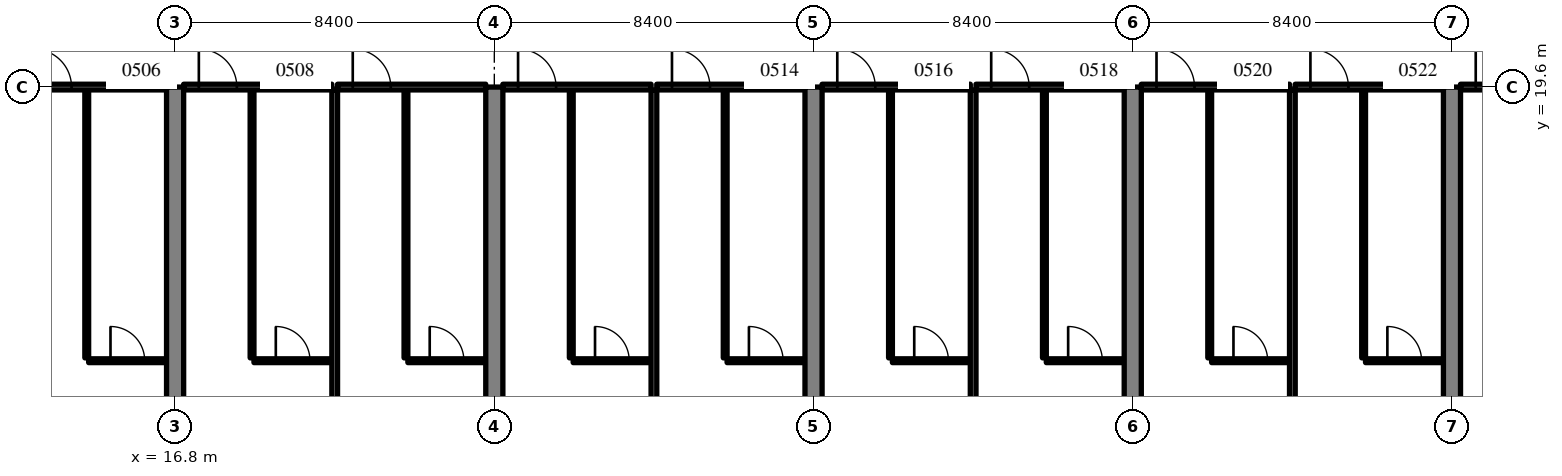
"""IFC4 building model, lengths in metres.
Left out: names, types, materials, properties, quantities, classifications, styles, units other than length and angle.
Written with IfcOpenShell. Run it as: python <this file> out.ifc"""

import sys

from ifc_helpers import new_model, si_unit, direction, frame, frame_2d, origin, place, context, subcontext, project, spatial, rectangle, extrude, source, transform, mapped, element, fill, save


model = new_model("IFC4")
c1 = context("Model", 3, precision=1e-05, world=origin(), true_north=direction((0.0, 1.0)))
c2 = subcontext(c1, "Body", "Model", "MODEL_VIEW")
j1 = project(units=[si_unit("LENGTHUNIT", "METRE"), si_unit("PLANEANGLEUNIT", "RADIAN")], contexts=[c1])
p1 = place(None, origin())
s1 = spatial("IfcSite", under=j1, at=p1, CompositionType="ELEMENT")
p2 = place(p1, origin())
s2 = spatial("IfcBuilding", under=s1, at=p2, CompositionType="ELEMENT")
p3 = place(p2, frame((0.0, 0.0, 27.8)))
s3 = spatial("IfcBuildingStorey", under=s2, at=p3, CompositionType="ELEMENT", Elevation=27.8)
m1 = source(origin(), c2, "Body", "SweptSolid", [
    extrude(rectangle(XDim=19.6, YDim=0.45, at=frame_2d((9.8, 0.0))), origin(), (0.0, 0.0, 1.0), 3.52),
])
for number, where, z_axis, x_axis in (
    (1, (16.8, 0.0, 0.0), (0.0, 0.0, 1.0), (0.0, 1.0, 0.0)),
    (2, (25.2, 0.0, 0.0), (0.0, 0.0, 1.0), (0.0, 1.0, 0.0)),
    (3, (33.6, 0.0, 0.0), (0.0, 0.0, 1.0), (0.0, 1.0, 0.0)),
    (4, (42.0, 0.0, 0.0), (0.0, 0.0, 1.0), (0.0, 1.0, 0.0)),
):
    element("IfcWall", number, at=place(p3, frame(where, z_axis=z_axis, x_axis=x_axis)), inside=s3, PredefinedType="SHEAR", context=c2, shape_type="MappedRepresentation", body=[
        mapped(m1, transform((0.0, 0.0, 0.0), scale=1.0)),
    ])
m2 = source(origin(), c2, "Body", "SweptSolid", [
    extrude(rectangle(XDim=18.6, YDim=0.45, at=frame_2d((9.3, 0.0))), origin(), (0.0, 0.0, 1.0), 3.52),
])
p4 = place(p3, frame((50.4, 1.0, 0.0), z_axis=(0.0, 0.0, 1.0), x_axis=(0.0, 1.0, 0.0)))
e5 = element("IfcWall", 5, at=p4, inside=s3, PredefinedType="SHEAR", context=c2, shape_type="MappedRepresentation", body=[
    mapped(m2, transform((0.0, 0.0, 0.0), scale=1.0)),
])
m3 = source(origin(), c2, "Body", "SweptSolid", [
    extrude(rectangle(XDim=7.05, YDim=0.1, at=frame_2d((3.525, 0.0))), origin(), (0.0, 0.0, 1.0), 3.52),
])
p5 = place(p3, frame((14.475, 12.475, 0.0), z_axis=(0.0, 0.0, 1.0), x_axis=(0.0, 1.0, 0.0)))
e6 = element("IfcWall", 6, at=p5, inside=s3, PredefinedType="PARTITIONING", context=c2, shape_type="MappedRepresentation", body=[
    mapped(m3, transform((0.0, 0.0, 0.0), scale=1.0)),
])
m4 = source(origin(), c2, "Body", "SweptSolid", [
    extrude(rectangle(XDim=2.05, YDim=0.1, at=frame_2d((1.025, 0.0))), origin(), (0.0, 0.0, 1.0), 3.52),
])
p6 = place(p3, frame((14.525, 12.4, 0.0), z_axis=(0.0, 0.0, 1.0), x_axis=(1.0, 0.0, 0.0)))
e7 = element("IfcWall", 7, at=p6, inside=s3, PredefinedType="PARTITIONING", context=c2, shape_type="MappedRepresentation", body=[
    mapped(m4, transform((0.0, 0.0, 0.0), scale=1.0)),
])
m5 = source(origin(), c2, "Body", "SweptSolid", [
    extrude(rectangle(XDim=0.9, YDim=2.1, at=frame_2d((0.45, 1.05))), frame((0.0, 0.06, 0.0), z_axis=(0.0, -1.0, 0.0), x_axis=(1.0, 0.0, 0.0)), (0.0, 0.0, 1.0), 0.12),
])
p7 = place(p6, frame((0.575, 0.0, 0.0)))
e8 = element("IfcOpeningElement", 8, at=p7, cuts=e7, PredefinedType="OPENING", context=c2, shape_type="MappedRepresentation", body=[
    mapped(m5, transform((0.0, 0.0, 0.0), scale=1.0)),
])
m6 = source(origin(), c2, "Body", "SweptSolid", [
    extrude(rectangle(XDim=3.9, YDim=0.15, at=frame_2d((1.95, 0.0))), origin(), (0.0, 0.0, 1.0), 2.82),
])
p8 = place(p3, frame((12.675, 19.6, 0.0), z_axis=(0.0, 0.0, 1.0), x_axis=(1.0, 0.0, 0.0)))
e9 = element("IfcWall", 9, at=p8, inside=s3, PredefinedType="PARTITIONING", context=c2, shape_type="MappedRepresentation", body=[
    mapped(m6, transform((0.0, 0.0, 0.0), scale=1.0)),
])
m7 = source(origin(), c2, "Body", "SweptSolid", [
    extrude(rectangle(XDim=1.0, YDim=2.1, at=frame_2d((0.5, 1.05))), frame((0.0, 0.085, 0.0), z_axis=(0.0, -1.0, 0.0), x_axis=(1.0, 0.0, 0.0)), (0.0, 0.0, 1.0), 0.17),
])
p9 = place(p8, frame((0.4, 0.0, 0.0)))
e10 = element("IfcOpeningElement", 10, at=p9, cuts=e9, PredefinedType="OPENING", context=c2, shape_type="MappedRepresentation", body=[
    mapped(m7, transform((0.0, 0.0, 0.0), scale=1.0)),
])
p10 = place(p3, frame((18.825, 12.475, 0.0), z_axis=(0.0, 0.0, 1.0), x_axis=(0.0, 1.0, 0.0)))
e11 = element("IfcWall", 11, at=p10, inside=s3, PredefinedType="PARTITIONING", context=c2, shape_type="MappedRepresentation", body=[
    mapped(m3, transform((0.0, 0.0, 0.0), scale=1.0)),
])
p11 = place(p3, frame((18.875, 12.4, 0.0), z_axis=(0.0, 0.0, 1.0), x_axis=(1.0, 0.0, 0.0)))
e12 = element("IfcWall", 12, at=p11, inside=s3, PredefinedType="PARTITIONING", context=c2, shape_type="MappedRepresentation", body=[
    mapped(m4, transform((0.0, 0.0, 0.0), scale=1.0)),
])
p12 = place(p11, frame((0.575, 0.0, 0.0)))
e13 = element("IfcOpeningElement", 13, at=p12, cuts=e12, PredefinedType="OPENING", context=c2, shape_type="MappedRepresentation", body=[
    mapped(m5, transform((0.0, 0.0, 0.0), scale=1.0)),
])
m8 = source(origin(), c2, "Body", "SweptSolid", [
    extrude(rectangle(XDim=3.9, YDim=0.15, at=frame_2d((1.95, 0.0))), origin(), (0.0, 0.0, 1.0), 2.82),
])
p13 = place(p3, frame((17.025, 19.6, 0.0), z_axis=(0.0, 0.0, 1.0), x_axis=(1.0, 0.0, 0.0)))
e14 = element("IfcWall", 14, at=p13, inside=s3, PredefinedType="PARTITIONING", context=c2, shape_type="MappedRepresentation", body=[
    mapped(m8, transform((0.0, 0.0, 0.0), scale=1.0)),
])
p14 = place(p13, frame((0.4, 0.0, 0.0)))
e15 = element("IfcOpeningElement", 15, at=p14, cuts=e14, PredefinedType="OPENING", context=c2, shape_type="MappedRepresentation", body=[
    mapped(m7, transform((0.0, 0.0, 0.0), scale=1.0)),
])
p15 = place(p3, frame((22.875, 12.475, 0.0), z_axis=(0.0, 0.0, 1.0), x_axis=(0.0, 1.0, 0.0)))
e16 = element("IfcWall", 16, at=p15, inside=s3, PredefinedType="PARTITIONING", context=c2, shape_type="MappedRepresentation", body=[
    mapped(m3, transform((0.0, 0.0, 0.0), scale=1.0)),
])
p16 = place(p3, frame((22.925, 12.4, 0.0), z_axis=(0.0, 0.0, 1.0), x_axis=(1.0, 0.0, 0.0)))
e17 = element("IfcWall", 17, at=p16, inside=s3, PredefinedType="PARTITIONING", context=c2, shape_type="MappedRepresentation", body=[
    mapped(m4, transform((0.0, 0.0, 0.0), scale=1.0)),
])
p17 = place(p16, frame((0.575, 0.0, 0.0)))
e18 = element("IfcOpeningElement", 18, at=p17, cuts=e17, PredefinedType="OPENING", context=c2, shape_type="MappedRepresentation", body=[
    mapped(m5, transform((0.0, 0.0, 0.0), scale=1.0)),
])
p18 = place(p3, frame((21.075, 19.6, 0.0), z_axis=(0.0, 0.0, 1.0), x_axis=(1.0, 0.0, 0.0)))
e19 = element("IfcWall", 19, at=p18, inside=s3, PredefinedType="PARTITIONING", context=c2, shape_type="MappedRepresentation", body=[
    mapped(m8, transform((0.0, 0.0, 0.0), scale=1.0)),
])
p19 = place(p18, frame((0.4, 0.0, 0.0)))
e20 = element("IfcOpeningElement", 20, at=p19, cuts=e19, PredefinedType="OPENING", context=c2, shape_type="MappedRepresentation", body=[
    mapped(m7, transform((0.0, 0.0, 0.0), scale=1.0)),
])
m9 = source(origin(), c2, "Body", "SweptSolid", [
    extrude(rectangle(XDim=18.625, YDim=0.15, at=frame_2d((9.312, 0.0))), origin(), (0.0, 0.0, 1.0), 3.52),
])
p20 = place(p3, frame((21.0, 0.9, 0.0), z_axis=(0.0, 0.0, 1.0), x_axis=(0.0, 1.0, 0.0)))
e21 = element("IfcWall", 21, at=p20, inside=s3, PredefinedType="PARTITIONING", context=c2, shape_type="MappedRepresentation", body=[
    mapped(m9, transform((0.0, 0.0, 0.0), scale=1.0)),
])
p21 = place(p3, frame((27.225, 12.475, 0.0), z_axis=(0.0, 0.0, 1.0), x_axis=(0.0, 1.0, 0.0)))
e22 = element("IfcWall", 22, at=p21, inside=s3, PredefinedType="PARTITIONING", context=c2, shape_type="MappedRepresentation", body=[
    mapped(m3, transform((0.0, 0.0, 0.0), scale=1.0)),
])
p22 = place(p3, frame((27.275, 12.4, 0.0), z_axis=(0.0, 0.0, 1.0), x_axis=(1.0, 0.0, 0.0)))
e23 = element("IfcWall", 23, at=p22, inside=s3, PredefinedType="PARTITIONING", context=c2, shape_type="MappedRepresentation", body=[
    mapped(m4, transform((0.0, 0.0, 0.0), scale=1.0)),
])
p23 = place(p22, frame((0.575, 0.0, 0.0)))
e24 = element("IfcOpeningElement", 24, at=p23, cuts=e23, PredefinedType="OPENING", context=c2, shape_type="MappedRepresentation", body=[
    mapped(m5, transform((0.0, 0.0, 0.0), scale=1.0)),
])
p24 = place(p3, frame((25.425, 19.6, 0.0), z_axis=(0.0, 0.0, 1.0), x_axis=(1.0, 0.0, 0.0)))
e25 = element("IfcWall", 25, at=p24, inside=s3, PredefinedType="PARTITIONING", context=c2, shape_type="MappedRepresentation", body=[
    mapped(m6, transform((0.0, 0.0, 0.0), scale=1.0)),
])
p25 = place(p24, frame((0.4, 0.0, 0.0)))
e26 = element("IfcOpeningElement", 26, at=p25, cuts=e25, PredefinedType="OPENING", context=c2, shape_type="MappedRepresentation", body=[
    mapped(m7, transform((0.0, 0.0, 0.0), scale=1.0)),
])
p26 = place(p3, frame((31.275, 12.475, 0.0), z_axis=(0.0, 0.0, 1.0), x_axis=(0.0, 1.0, 0.0)))
e27 = element("IfcWall", 27, at=p26, inside=s3, PredefinedType="PARTITIONING", context=c2, shape_type="MappedRepresentation", body=[
    mapped(m3, transform((0.0, 0.0, 0.0), scale=1.0)),
])
p27 = place(p3, frame((31.325, 12.4, 0.0), z_axis=(0.0, 0.0, 1.0), x_axis=(1.0, 0.0, 0.0)))
e28 = element("IfcWall", 28, at=p27, inside=s3, PredefinedType="PARTITIONING", context=c2, shape_type="MappedRepresentation", body=[
    mapped(m4, transform((0.0, 0.0, 0.0), scale=1.0)),
])
p28 = place(p27, frame((0.575, 0.0, 0.0)))
e29 = element("IfcOpeningElement", 29, at=p28, cuts=e28, PredefinedType="OPENING", context=c2, shape_type="MappedRepresentation", body=[
    mapped(m5, transform((0.0, 0.0, 0.0), scale=1.0)),
])
p29 = place(p3, frame((29.475, 19.6, 0.0), z_axis=(0.0, 0.0, 1.0), x_axis=(1.0, 0.0, 0.0)))
e30 = element("IfcWall", 30, at=p29, inside=s3, PredefinedType="PARTITIONING", context=c2, shape_type="MappedRepresentation", body=[
    mapped(m6, transform((0.0, 0.0, 0.0), scale=1.0)),
])
p30 = place(p29, frame((0.4, 0.0, 0.0)))
e31 = element("IfcOpeningElement", 31, at=p30, cuts=e30, PredefinedType="OPENING", context=c2, shape_type="MappedRepresentation", body=[
    mapped(m7, transform((0.0, 0.0, 0.0), scale=1.0)),
])
p31 = place(p3, frame((29.4, 0.9, 0.0), z_axis=(0.0, 0.0, 1.0), x_axis=(0.0, 1.0, 0.0)))
e32 = element("IfcWall", 32, at=p31, inside=s3, PredefinedType="PARTITIONING", context=c2, shape_type="MappedRepresentation", body=[
    mapped(m9, transform((0.0, 0.0, 0.0), scale=1.0)),
])
p32 = place(p3, frame((35.625, 12.475, 0.0), z_axis=(0.0, 0.0, 1.0), x_axis=(0.0, 1.0, 0.0)))
e33 = element("IfcWall", 33, at=p32, inside=s3, PredefinedType="PARTITIONING", context=c2, shape_type="MappedRepresentation", body=[
    mapped(m3, transform((0.0, 0.0, 0.0), scale=1.0)),
])
p33 = place(p3, frame((35.675, 12.4, 0.0), z_axis=(0.0, 0.0, 1.0), x_axis=(1.0, 0.0, 0.0)))
e34 = element("IfcWall", 34, at=p33, inside=s3, PredefinedType="PARTITIONING", context=c2, shape_type="MappedRepresentation", body=[
    mapped(m4, transform((0.0, 0.0, 0.0), scale=1.0)),
])
p34 = place(p33, frame((0.575, 0.0, 0.0)))
e35 = element("IfcOpeningElement", 35, at=p34, cuts=e34, PredefinedType="OPENING", context=c2, shape_type="MappedRepresentation", body=[
    mapped(m5, transform((0.0, 0.0, 0.0), scale=1.0)),
])
p35 = place(p3, frame((33.825, 19.6, 0.0), z_axis=(0.0, 0.0, 1.0), x_axis=(1.0, 0.0, 0.0)))
e36 = element("IfcWall", 36, at=p35, inside=s3, PredefinedType="PARTITIONING", context=c2, shape_type="MappedRepresentation", body=[
    mapped(m8, transform((0.0, 0.0, 0.0), scale=1.0)),
])
p36 = place(p35, frame((0.4, 0.0, 0.0)))
e37 = element("IfcOpeningElement", 37, at=p36, cuts=e36, PredefinedType="OPENING", context=c2, shape_type="MappedRepresentation", body=[
    mapped(m7, transform((0.0, 0.0, 0.0), scale=1.0)),
])
p37 = place(p3, frame((39.675, 12.475, 0.0), z_axis=(0.0, 0.0, 1.0), x_axis=(0.0, 1.0, 0.0)))
e38 = element("IfcWall", 38, at=p37, inside=s3, PredefinedType="PARTITIONING", context=c2, shape_type="MappedRepresentation", body=[
    mapped(m3, transform((0.0, 0.0, 0.0), scale=1.0)),
])
m10 = source(origin(), c2, "Body", "SweptSolid", [
    extrude(rectangle(XDim=2.05, YDim=0.1, at=frame_2d((1.025, 0.0))), origin(), (0.0, 0.0, 1.0), 3.52),
])
p38 = place(p3, frame((39.725, 12.4, 0.0), z_axis=(0.0, 0.0, 1.0), x_axis=(1.0, 0.0, 0.0)))
e39 = element("IfcWall", 39, at=p38, inside=s3, PredefinedType="PARTITIONING", context=c2, shape_type="MappedRepresentation", body=[
    mapped(m10, transform((0.0, 0.0, 0.0), scale=1.0)),
])
p39 = place(p38, frame((0.575, 0.0, 0.0)))
e40 = element("IfcOpeningElement", 40, at=p39, cuts=e39, PredefinedType="OPENING", context=c2, shape_type="MappedRepresentation", body=[
    mapped(m5, transform((0.0, 0.0, 0.0), scale=1.0)),
])
p40 = place(p3, frame((37.875, 19.6, 0.0), z_axis=(0.0, 0.0, 1.0), x_axis=(1.0, 0.0, 0.0)))
e41 = element("IfcWall", 41, at=p40, inside=s3, PredefinedType="PARTITIONING", context=c2, shape_type="MappedRepresentation", body=[
    mapped(m6, transform((0.0, 0.0, 0.0), scale=1.0)),
])
p41 = place(p40, frame((0.4, 0.0, 0.0)))
e42 = element("IfcOpeningElement", 42, at=p41, cuts=e41, PredefinedType="OPENING", context=c2, shape_type="MappedRepresentation", body=[
    mapped(m7, transform((0.0, 0.0, 0.0), scale=1.0)),
])
m11 = source(origin(), c2, "Body", "SweptSolid", [
    extrude(rectangle(XDim=20.998, YDim=0.15, at=frame_2d((10.499, 0.0))), origin(), (0.0, 0.0, 1.0), 3.52),
])
p42 = place(p3, frame((37.8, -1.473, 0.0), z_axis=(0.0, 0.0, 1.0), x_axis=(0.0, 1.0, 0.0)))
e43 = element("IfcWall", 43, at=p42, inside=s3, PredefinedType="PARTITIONING", context=c2, shape_type="MappedRepresentation", body=[
    mapped(m11, transform((0.0, 0.0, 0.0), scale=1.0)),
])
p43 = place(p3, frame((44.025, 12.475, 0.0), z_axis=(0.0, 0.0, 1.0), x_axis=(0.0, 1.0, 0.0)))
e44 = element("IfcWall", 44, at=p43, inside=s3, PredefinedType="PARTITIONING", context=c2, shape_type="MappedRepresentation", body=[
    mapped(m3, transform((0.0, 0.0, 0.0), scale=1.0)),
])
p44 = place(p3, frame((44.075, 12.4, 0.0), z_axis=(0.0, 0.0, 1.0), x_axis=(1.0, 0.0, 0.0)))
e45 = element("IfcWall", 45, at=p44, inside=s3, PredefinedType="PARTITIONING", context=c2, shape_type="MappedRepresentation", body=[
    mapped(m4, transform((0.0, 0.0, 0.0), scale=1.0)),
])
p45 = place(p44, frame((0.575, 0.0, 0.0)))
e46 = element("IfcOpeningElement", 46, at=p45, cuts=e45, PredefinedType="OPENING", context=c2, shape_type="MappedRepresentation", body=[
    mapped(m5, transform((0.0, 0.0, 0.0), scale=1.0)),
])
p46 = place(p3, frame((42.225, 19.6, 0.0), z_axis=(0.0, 0.0, 1.0), x_axis=(1.0, 0.0, 0.0)))
e47 = element("IfcWall", 47, at=p46, inside=s3, PredefinedType="PARTITIONING", context=c2, shape_type="MappedRepresentation", body=[
    mapped(m6, transform((0.0, 0.0, 0.0), scale=1.0)),
])
p47 = place(p46, frame((0.4, 0.0, 0.0)))
e48 = element("IfcOpeningElement", 48, at=p47, cuts=e47, PredefinedType="OPENING", context=c2, shape_type="MappedRepresentation", body=[
    mapped(m7, transform((0.0, 0.0, 0.0), scale=1.0)),
])
p48 = place(p3, frame((48.075, 12.475, 0.0), z_axis=(0.0, 0.0, 1.0), x_axis=(0.0, 1.0, 0.0)))
e49 = element("IfcWall", 49, at=p48, inside=s3, PredefinedType="PARTITIONING", context=c2, shape_type="MappedRepresentation", body=[
    mapped(m3, transform((0.0, 0.0, 0.0), scale=1.0)),
])
p49 = place(p3, frame((48.125, 12.4, 0.0), z_axis=(0.0, 0.0, 1.0), x_axis=(1.0, 0.0, 0.0)))
e50 = element("IfcWall", 50, at=p49, inside=s3, PredefinedType="PARTITIONING", context=c2, shape_type="MappedRepresentation", body=[
    mapped(m4, transform((0.0, 0.0, 0.0), scale=1.0)),
])
p50 = place(p49, frame((0.575, 0.0, 0.0)))
e51 = element("IfcOpeningElement", 51, at=p50, cuts=e50, PredefinedType="OPENING", context=c2, shape_type="MappedRepresentation", body=[
    mapped(m5, transform((0.0, 0.0, 0.0), scale=1.0)),
])
p51 = place(p3, frame((46.275, 19.6, 0.0), z_axis=(0.0, 0.0, 1.0), x_axis=(1.0, 0.0, 0.0)))
e52 = element("IfcWall", 52, at=p51, inside=s3, PredefinedType="PARTITIONING", context=c2, shape_type="MappedRepresentation", body=[
    mapped(m8, transform((0.0, 0.0, 0.0), scale=1.0)),
])
p52 = place(p51, frame((0.4, 0.0, 0.0)))
e53 = element("IfcOpeningElement", 53, at=p52, cuts=e52, PredefinedType="OPENING", context=c2, shape_type="MappedRepresentation", body=[
    mapped(m7, transform((0.0, 0.0, 0.0), scale=1.0)),
])
m12 = source(origin(), c2, "Body", "SweptSolid", [
    extrude(rectangle(XDim=20.406, YDim=0.15, at=frame_2d((10.203, 0.0))), origin(), (0.0, 0.0, 1.0), 3.52),
])
p53 = place(p3, frame((46.2, -0.881, 0.0), z_axis=(0.0, 0.0, 1.0), x_axis=(0.0, 1.0, 0.0)))
e54 = element("IfcWall", 54, at=p53, inside=s3, PredefinedType="PARTITIONING", context=c2, shape_type="MappedRepresentation", body=[
    mapped(m12, transform((0.0, 0.0, 0.0), scale=1.0)),
])
p54 = place(p3, frame((50.625, 19.6, 0.0), z_axis=(0.0, 0.0, 1.0), x_axis=(1.0, 0.0, 0.0)))
e55 = element("IfcWall", 55, at=p54, inside=s3, PredefinedType="PARTITIONING", context=c2, shape_type="MappedRepresentation", body=[
    mapped(m6, transform((0.0, 0.0, 0.0), scale=1.0)),
])
p55 = place(p54, frame((0.4, 0.0, 0.0)))
e56 = element("IfcOpeningElement", 56, at=p55, cuts=e55, PredefinedType="OPENING", context=c2, shape_type="MappedRepresentation", body=[
    mapped(m7, transform((0.0, 0.0, 0.0), scale=1.0)),
])
m13 = source(origin(), c2, "Body", "SweptSolid", [
    extrude(rectangle(XDim=0.9, YDim=2.1, at=frame_2d((0.45, 1.05))), frame((0.0, 0.025, 0.0), z_axis=(0.0, -1.0, 0.0), x_axis=(1.0, 0.0, 0.0)), (0.0, 0.0, 1.0), 0.05),
])
p56 = place(p7, origin())
e57 = element("IfcDoor", 57, at=p56, inside=s3, OperationType="SINGLE_SWING_LEFT", PredefinedType="DOOR", context=c2, shape_type="MappedRepresentation", body=[
    mapped(m13, transform((0.0, 0.0, 0.0), scale=1.0)),
])
fill(e8, e57)
m14 = source(origin(), c2, "Body", "SweptSolid", [
    extrude(rectangle(XDim=1.0, YDim=2.1, at=frame_2d((0.5, 1.05))), frame((0.0, 0.025, 0.0), z_axis=(0.0, -1.0, 0.0), x_axis=(1.0, 0.0, 0.0)), (0.0, 0.0, 1.0), 0.05),
])
p57 = place(p9, origin())
e58 = element("IfcDoor", 58, at=p57, inside=s3, OperationType="SINGLE_SWING_LEFT", PredefinedType="DOOR", context=c2, shape_type="MappedRepresentation", body=[
    mapped(m14, transform((0.0, 0.0, 0.0), scale=1.0)),
])
fill(e10, e58)
p58 = place(p12, origin())
e59 = element("IfcDoor", 59, at=p58, inside=s3, OperationType="SINGLE_SWING_LEFT", PredefinedType="DOOR", context=c2, shape_type="MappedRepresentation", body=[
    mapped(m13, transform((0.0, 0.0, 0.0), scale=1.0)),
])
fill(e13, e59)
p59 = place(p14, origin())
e60 = element("IfcDoor", 60, at=p59, inside=s3, OperationType="SINGLE_SWING_LEFT", PredefinedType="DOOR", context=c2, shape_type="MappedRepresentation", body=[
    mapped(m14, transform((0.0, 0.0, 0.0), scale=1.0)),
])
fill(e15, e60)
p60 = place(p17, origin())
e61 = element("IfcDoor", 61, at=p60, inside=s3, OperationType="SINGLE_SWING_LEFT", PredefinedType="DOOR", context=c2, shape_type="MappedRepresentation", body=[
    mapped(m13, transform((0.0, 0.0, 0.0), scale=1.0)),
])
fill(e18, e61)
p61 = place(p19, origin())
e62 = element("IfcDoor", 62, at=p61, inside=s3, OperationType="SINGLE_SWING_LEFT", PredefinedType="DOOR", context=c2, shape_type="MappedRepresentation", body=[
    mapped(m14, transform((0.0, 0.0, 0.0), scale=1.0)),
])
fill(e20, e62)
p62 = place(p23, origin())
e63 = element("IfcDoor", 63, at=p62, inside=s3, OperationType="SINGLE_SWING_LEFT", PredefinedType="DOOR", context=c2, shape_type="MappedRepresentation", body=[
    mapped(m13, transform((0.0, 0.0, 0.0), scale=1.0)),
])
fill(e24, e63)
p63 = place(p25, origin())
e64 = element("IfcDoor", 64, at=p63, inside=s3, OperationType="SINGLE_SWING_LEFT", PredefinedType="DOOR", context=c2, shape_type="MappedRepresentation", body=[
    mapped(m14, transform((0.0, 0.0, 0.0), scale=1.0)),
])
fill(e26, e64)
p64 = place(p28, origin())
e65 = element("IfcDoor", 65, at=p64, inside=s3, OperationType="SINGLE_SWING_LEFT", PredefinedType="DOOR", context=c2, shape_type="MappedRepresentation", body=[
    mapped(m13, transform((0.0, 0.0, 0.0), scale=1.0)),
])
fill(e29, e65)
p65 = place(p30, origin())
e66 = element("IfcDoor", 66, at=p65, inside=s3, OperationType="SINGLE_SWING_LEFT", PredefinedType="DOOR", context=c2, shape_type="MappedRepresentation", body=[
    mapped(m14, transform((0.0, 0.0, 0.0), scale=1.0)),
])
fill(e31, e66)
p66 = place(p34, origin())
e67 = element("IfcDoor", 67, at=p66, inside=s3, OperationType="SINGLE_SWING_LEFT", PredefinedType="DOOR", context=c2, shape_type="MappedRepresentation", body=[
    mapped(m13, transform((0.0, 0.0, 0.0), scale=1.0)),
])
fill(e35, e67)
p67 = place(p36, origin())
e68 = element("IfcDoor", 68, at=p67, inside=s3, OperationType="SINGLE_SWING_LEFT", PredefinedType="DOOR", context=c2, shape_type="MappedRepresentation", body=[
    mapped(m14, transform((0.0, 0.0, 0.0), scale=1.0)),
])
fill(e37, e68)
p68 = place(p39, origin())
e69 = element("IfcDoor", 69, at=p68, inside=s3, OperationType="SINGLE_SWING_LEFT", PredefinedType="DOOR", context=c2, shape_type="MappedRepresentation", body=[
    mapped(m13, transform((0.0, 0.0, 0.0), scale=1.0)),
])
fill(e40, e69)
p69 = place(p41, origin())
e70 = element("IfcDoor", 70, at=p69, inside=s3, OperationType="SINGLE_SWING_LEFT", PredefinedType="DOOR", context=c2, shape_type="MappedRepresentation", body=[
    mapped(m14, transform((0.0, 0.0, 0.0), scale=1.0)),
])
fill(e42, e70)
p70 = place(p45, origin())
e71 = element("IfcDoor", 71, at=p70, inside=s3, OperationType="SINGLE_SWING_LEFT", PredefinedType="DOOR", context=c2, shape_type="MappedRepresentation", body=[
    mapped(m13, transform((0.0, 0.0, 0.0), scale=1.0)),
])
fill(e46, e71)
p71 = place(p47, origin())
e72 = element("IfcDoor", 72, at=p71, inside=s3, OperationType="SINGLE_SWING_LEFT", PredefinedType="DOOR", context=c2, shape_type="MappedRepresentation", body=[
    mapped(m14, transform((0.0, 0.0, 0.0), scale=1.0)),
])
fill(e48, e72)
p72 = place(p50, origin())
e73 = element("IfcDoor", 73, at=p72, inside=s3, OperationType="SINGLE_SWING_LEFT", PredefinedType="DOOR", context=c2, shape_type="MappedRepresentation", body=[
    mapped(m13, transform((0.0, 0.0, 0.0), scale=1.0)),
])
fill(e51, e73)
p73 = place(p52, origin())
e74 = element("IfcDoor", 74, at=p73, inside=s3, OperationType="SINGLE_SWING_LEFT", PredefinedType="DOOR", context=c2, shape_type="MappedRepresentation", body=[
    mapped(m14, transform((0.0, 0.0, 0.0), scale=1.0)),
])
fill(e53, e74)
p74 = place(p55, origin())
e75 = element("IfcDoor", 75, at=p74, inside=s3, OperationType="SINGLE_SWING_LEFT", PredefinedType="DOOR", context=c2, shape_type="MappedRepresentation", body=[
    mapped(m14, transform((0.0, 0.0, 0.0), scale=1.0)),
])
fill(e56, e75)
save(model, sys.argv[1])
